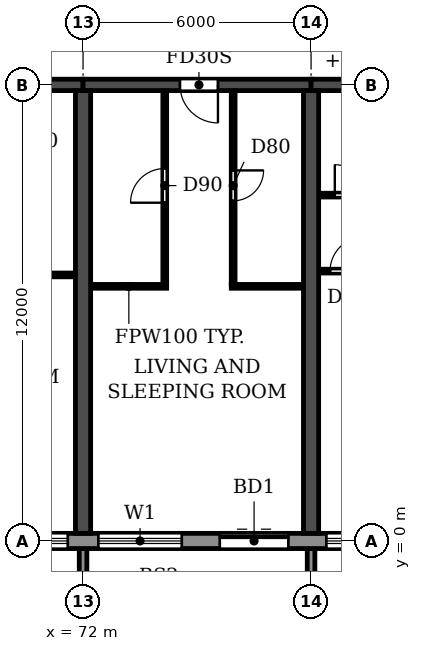
"""IFC4 building model, lengths in metres.
Left out: names, types, materials, properties, quantities, classifications, styles, units other than length and angle.
Written with IfcOpenShell. Run it as: python <this file> out.ifc"""

import sys

from ifc_helpers import new_model, si_unit, direction, frame, frame_2d, origin, place, context, subcontext, project, spatial, polyline, rectangle, outline, extrude, source, transform, mapped, element, fill, save


model = new_model("IFC4")
c1 = context("Model", 3, precision=1e-05, world=origin(), true_north=direction((0.0, 1.0)))
c2 = subcontext(c1, "Body", "Model", "MODEL_VIEW")
j1 = project(units=[si_unit("LENGTHUNIT", "METRE"), si_unit("PLANEANGLEUNIT", "RADIAN")], contexts=[c1])
p1 = place(None, origin())
s1 = spatial("IfcSite", under=j1, at=p1, CompositionType="ELEMENT")
p2 = place(p1, origin())
s2 = spatial("IfcBuilding", under=s1, at=p2, CompositionType="ELEMENT")
p3 = place(p2, frame((0.0, 0.0, 23.4)))
s3 = spatial("IfcBuildingStorey", under=s2, at=p3, CompositionType="ELEMENT", Elevation=23.4)
for number, where, z_axis, x_axis in (
    (1, (72.0, 0.2, 0.0), (0.0, 0.0, 1.0), (0.0, 1.0, 0.0)),
    (2, (78.0, 0.2, 0.0), (0.0, 0.0, 1.0), (0.0, 1.0, 0.0)),
):
    element("IfcWall", number, at=place(p3, frame(where, z_axis=z_axis, x_axis=x_axis)), inside=s3, PredefinedType="SHEAR", context=c2, shape_type="SweptSolid", body=[
        extrude(rectangle(XDim=11.65, YDim=0.4, at=frame_2d((5.825, 0.0))), origin(), (0.0, 0.0, 1.0), 3.05),
    ])
p4 = place(p3, frame((66.0, 12.0, 0.0), z_axis=(0.0, 0.0, 1.0), x_axis=(1.0, 0.0, 0.0)))
e3 = element("IfcWall", 3, at=p4, inside=s3, PredefinedType="SHEAR", context=c2, shape_type="SweptSolid", body=[
    extrude(rectangle(XDim=6.0, YDim=0.3, at=frame_2d((3.0, 0.0))), origin(), (0.0, 0.0, 1.0), 2.45),
])
p5 = place(p4, frame((2.45, 0.0, 0.0)))
e4 = element("IfcOpeningElement", 4, at=p5, cuts=e3, PredefinedType="OPENING", context=c2, shape_type="SweptSolid", body=[
    extrude(rectangle(XDim=1.0, YDim=2.1, at=frame_2d((0.5, 1.05))), frame((0.0, 0.16, 0.0), z_axis=(0.0, -1.0, 0.0), x_axis=(1.0, 0.0, 0.0)), (0.0, 0.0, 1.0), 0.32),
])
p6 = place(p3, frame((72.0, 12.0, 0.0), z_axis=(0.0, 0.0, 1.0), x_axis=(1.0, 0.0, 0.0)))
e5 = element("IfcWall", 5, at=p6, inside=s3, PredefinedType="SHEAR", context=c2, shape_type="SweptSolid", body=[
    extrude(rectangle(XDim=6.0, YDim=0.3, at=frame_2d((3.0, 0.0))), origin(), (0.0, 0.0, 1.0), 2.45),
])
p7 = place(p6, frame((2.55, 0.0, 0.0)))
e6 = element("IfcOpeningElement", 6, at=p7, cuts=e5, PredefinedType="OPENING", context=c2, shape_type="SweptSolid", body=[
    extrude(rectangle(XDim=1.0, YDim=2.1, at=frame_2d((0.5, 1.05))), frame((0.0, 0.16, 0.0), z_axis=(0.0, -1.0, 0.0), x_axis=(1.0, 0.0, 0.0)), (0.0, 0.0, 1.0), 0.32),
])
p8 = place(p3, frame((78.0, 12.0, 0.0), z_axis=(0.0, 0.0, 1.0), x_axis=(1.0, 0.0, 0.0)))
e7 = element("IfcWall", 7, at=p8, inside=s3, PredefinedType="SHEAR", context=c2, shape_type="SweptSolid", body=[
    extrude(rectangle(XDim=6.0, YDim=0.3, at=frame_2d((3.0, 0.0))), origin(), (0.0, 0.0, 1.0), 2.45),
])
p9 = place(p8, frame((2.45, 0.0, 0.0)))
e8 = element("IfcOpeningElement", 8, at=p9, cuts=e7, PredefinedType="OPENING", context=c2, shape_type="SweptSolid", body=[
    extrude(rectangle(XDim=1.0, YDim=2.1, at=frame_2d((0.5, 1.05))), frame((0.0, 0.16, 0.0), z_axis=(0.0, -1.0, 0.0), x_axis=(1.0, 0.0, 0.0)), (0.0, 0.0, 1.0), 0.32),
])
p10 = place(p3, frame((4.683, 0.0, 0.0), z_axis=(0.0, 0.0, 1.0), x_axis=(1.0, 0.0, 0.0)))
e9 = element("IfcWall", 9, at=p10, inside=s3, PredefinedType="STANDARD", context=c2, shape_type="SweptSolid", body=[
    extrude(rectangle(XDim=92.634, YDim=0.4, at=frame_2d((46.317, 0.0))), origin(), (0.0, 0.0, 1.0), 3.05),
])
p11 = place(p10, frame((1.717, 0.0, 0.9)))
e10 = element("IfcOpeningElement", 10, at=p11, cuts=e9, PredefinedType="OPENING", context=c2, shape_type="SweptSolid", body=[
    extrude(rectangle(XDim=2.2, YDim=1.5, at=frame_2d((1.1, 0.75))), frame((0.0, 0.21, 0.0), z_axis=(0.0, -1.0, 0.0), x_axis=(1.0, 0.0, 0.0)), (0.0, 0.0, 1.0), 0.42),
])
p12 = place(p10, frame((4.717, 0.0, 0.9)))
e11 = element("IfcOpeningElement", 11, at=p12, cuts=e9, PredefinedType="OPENING", context=c2, shape_type="SweptSolid", body=[
    extrude(rectangle(XDim=2.2, YDim=1.5, at=frame_2d((1.1, 0.75))), frame((0.0, 0.21, 0.0), z_axis=(0.0, -1.0, 0.0), x_axis=(1.0, 0.0, 0.0)), (0.0, 0.0, 1.0), 0.42),
])
p13 = place(p10, frame((7.717, 0.0, 0.9)))
e12 = element("IfcOpeningElement", 12, at=p13, cuts=e9, PredefinedType="OPENING", context=c2, shape_type="SweptSolid", body=[
    extrude(rectangle(XDim=2.2, YDim=1.5, at=frame_2d((1.1, 0.75))), frame((0.0, 0.21, 0.0), z_axis=(0.0, -1.0, 0.0), x_axis=(1.0, 0.0, 0.0)), (0.0, 0.0, 1.0), 0.42),
])
p14 = place(p10, frame((10.717, 0.0, 0.9)))
e13 = element("IfcOpeningElement", 13, at=p14, cuts=e9, PredefinedType="OPENING", context=c2, shape_type="SweptSolid", body=[
    extrude(rectangle(XDim=2.2, YDim=1.5, at=frame_2d((1.1, 0.75))), frame((0.0, 0.21, 0.0), z_axis=(0.0, -1.0, 0.0), x_axis=(1.0, 0.0, 0.0)), (0.0, 0.0, 1.0), 0.42),
])
p15 = place(p10, frame((13.717, 0.0, 0.9)))
e14 = element("IfcOpeningElement", 14, at=p15, cuts=e9, PredefinedType="OPENING", context=c2, shape_type="SweptSolid", body=[
    extrude(rectangle(XDim=2.2, YDim=1.5, at=frame_2d((1.1, 0.75))), frame((0.0, 0.21, 0.0), z_axis=(0.0, -1.0, 0.0), x_axis=(1.0, 0.0, 0.0)), (0.0, 0.0, 1.0), 0.42),
])
p16 = place(p10, frame((16.717, 0.0, 0.9)))
e15 = element("IfcOpeningElement", 15, at=p16, cuts=e9, PredefinedType="OPENING", context=c2, shape_type="SweptSolid", body=[
    extrude(rectangle(XDim=2.2, YDim=1.5, at=frame_2d((1.1, 0.75))), frame((0.0, 0.21, 0.0), z_axis=(0.0, -1.0, 0.0), x_axis=(1.0, 0.0, 0.0)), (0.0, 0.0, 1.0), 0.42),
])
p17 = place(p10, frame((19.917, 0.0, 0.0)))
e16 = element("IfcOpeningElement", 16, at=p17, cuts=e9, PredefinedType="OPENING", context=c2, shape_type="SweptSolid", body=[
    extrude(rectangle(XDim=1.8, YDim=2.4, at=frame_2d((0.9, 1.2))), frame((0.0, 0.21, 0.0), z_axis=(0.0, -1.0, 0.0), x_axis=(1.0, 0.0, 0.0)), (0.0, 0.0, 1.0), 0.42),
])
p18 = place(p10, frame((22.717, 0.0, 0.9)))
e17 = element("IfcOpeningElement", 17, at=p18, cuts=e9, PredefinedType="OPENING", context=c2, shape_type="SweptSolid", body=[
    extrude(rectangle(XDim=2.2, YDim=1.5, at=frame_2d((1.1, 0.75))), frame((0.0, 0.21, 0.0), z_axis=(0.0, -1.0, 0.0), x_axis=(1.0, 0.0, 0.0)), (0.0, 0.0, 1.0), 0.42),
])
p19 = place(p10, frame((25.717, 0.0, 0.9)))
e18 = element("IfcOpeningElement", 18, at=p19, cuts=e9, PredefinedType="OPENING", context=c2, shape_type="SweptSolid", body=[
    extrude(rectangle(XDim=2.2, YDim=1.5, at=frame_2d((1.1, 0.75))), frame((0.0, 0.21, 0.0), z_axis=(0.0, -1.0, 0.0), x_axis=(1.0, 0.0, 0.0)), (0.0, 0.0, 1.0), 0.42),
])
p20 = place(p10, frame((28.717, 0.0, 0.9)))
e19 = element("IfcOpeningElement", 19, at=p20, cuts=e9, PredefinedType="OPENING", context=c2, shape_type="SweptSolid", body=[
    extrude(rectangle(XDim=2.2, YDim=1.5, at=frame_2d((1.1, 0.75))), frame((0.0, 0.21, 0.0), z_axis=(0.0, -1.0, 0.0), x_axis=(1.0, 0.0, 0.0)), (0.0, 0.0, 1.0), 0.42),
])
p21 = place(p10, frame((31.917, 0.0, 0.0)))
e20 = element("IfcOpeningElement", 20, at=p21, cuts=e9, PredefinedType="OPENING", context=c2, shape_type="SweptSolid", body=[
    extrude(rectangle(XDim=1.8, YDim=2.4, at=frame_2d((0.9, 1.2))), frame((0.0, 0.21, 0.0), z_axis=(0.0, -1.0, 0.0), x_axis=(1.0, 0.0, 0.0)), (0.0, 0.0, 1.0), 0.42),
])
p22 = place(p10, frame((34.717, 0.0, 0.9)))
e21 = element("IfcOpeningElement", 21, at=p22, cuts=e9, PredefinedType="OPENING", context=c2, shape_type="SweptSolid", body=[
    extrude(rectangle(XDim=2.2, YDim=1.5, at=frame_2d((1.1, 0.75))), frame((0.0, 0.21, 0.0), z_axis=(0.0, -1.0, 0.0), x_axis=(1.0, 0.0, 0.0)), (0.0, 0.0, 1.0), 0.42),
])
p23 = place(p10, frame((37.717, 0.0, 0.9)))
e22 = element("IfcOpeningElement", 22, at=p23, cuts=e9, PredefinedType="OPENING", context=c2, shape_type="SweptSolid", body=[
    extrude(rectangle(XDim=2.2, YDim=1.5, at=frame_2d((1.1, 0.75))), frame((0.0, 0.21, 0.0), z_axis=(0.0, -1.0, 0.0), x_axis=(1.0, 0.0, 0.0)), (0.0, 0.0, 1.0), 0.42),
])
p24 = place(p10, frame((40.717, 0.0, 0.9)))
e23 = element("IfcOpeningElement", 23, at=p24, cuts=e9, PredefinedType="OPENING", context=c2, shape_type="SweptSolid", body=[
    extrude(rectangle(XDim=2.2, YDim=1.5, at=frame_2d((1.1, 0.75))), frame((0.0, 0.21, 0.0), z_axis=(0.0, -1.0, 0.0), x_axis=(1.0, 0.0, 0.0)), (0.0, 0.0, 1.0), 0.42),
])
p25 = place(p10, frame((43.917, 0.0, 0.0)))
e24 = element("IfcOpeningElement", 24, at=p25, cuts=e9, PredefinedType="OPENING", context=c2, shape_type="SweptSolid", body=[
    extrude(rectangle(XDim=1.8, YDim=2.4, at=frame_2d((0.9, 1.2))), frame((0.0, 0.21, 0.0), z_axis=(0.0, -1.0, 0.0), x_axis=(1.0, 0.0, 0.0)), (0.0, 0.0, 1.0), 0.42),
])
p26 = place(p10, frame((46.717, 0.0, 0.9)))
e25 = element("IfcOpeningElement", 25, at=p26, cuts=e9, PredefinedType="OPENING", context=c2, shape_type="SweptSolid", body=[
    extrude(rectangle(XDim=2.2, YDim=1.5, at=frame_2d((1.1, 0.75))), frame((0.0, 0.21, 0.0), z_axis=(0.0, -1.0, 0.0), x_axis=(1.0, 0.0, 0.0)), (0.0, 0.0, 1.0), 0.42),
])
p27 = place(p10, frame((49.717, 0.0, 0.9)))
e26 = element("IfcOpeningElement", 26, at=p27, cuts=e9, PredefinedType="OPENING", context=c2, shape_type="SweptSolid", body=[
    extrude(rectangle(XDim=2.2, YDim=1.5, at=frame_2d((1.1, 0.75))), frame((0.0, 0.21, 0.0), z_axis=(0.0, -1.0, 0.0), x_axis=(1.0, 0.0, 0.0)), (0.0, 0.0, 1.0), 0.42),
])
p28 = place(p10, frame((52.717, 0.0, 0.9)))
e27 = element("IfcOpeningElement", 27, at=p28, cuts=e9, PredefinedType="OPENING", context=c2, shape_type="SweptSolid", body=[
    extrude(rectangle(XDim=2.2, YDim=1.5, at=frame_2d((1.1, 0.75))), frame((0.0, 0.21, 0.0), z_axis=(0.0, -1.0, 0.0), x_axis=(1.0, 0.0, 0.0)), (0.0, 0.0, 1.0), 0.42),
])
p29 = place(p10, frame((55.717, 0.0, 0.9)))
e28 = element("IfcOpeningElement", 28, at=p29, cuts=e9, PredefinedType="OPENING", context=c2, shape_type="SweptSolid", body=[
    extrude(rectangle(XDim=2.2, YDim=1.5, at=frame_2d((1.1, 0.75))), frame((0.0, 0.21, 0.0), z_axis=(0.0, -1.0, 0.0), x_axis=(1.0, 0.0, 0.0)), (0.0, 0.0, 1.0), 0.42),
])
p30 = place(p10, frame((58.917, 0.0, 0.0)))
e29 = element("IfcOpeningElement", 29, at=p30, cuts=e9, PredefinedType="OPENING", context=c2, shape_type="SweptSolid", body=[
    extrude(rectangle(XDim=1.8, YDim=2.4, at=frame_2d((0.9, 1.2))), frame((0.0, 0.21, 0.0), z_axis=(0.0, -1.0, 0.0), x_axis=(1.0, 0.0, 0.0)), (0.0, 0.0, 1.0), 0.42),
])
p31 = place(p10, frame((61.717, 0.0, 0.9)))
e30 = element("IfcOpeningElement", 30, at=p31, cuts=e9, PredefinedType="OPENING", context=c2, shape_type="SweptSolid", body=[
    extrude(rectangle(XDim=2.2, YDim=1.5, at=frame_2d((1.1, 0.75))), frame((0.0, 0.21, 0.0), z_axis=(0.0, -1.0, 0.0), x_axis=(1.0, 0.0, 0.0)), (0.0, 0.0, 1.0), 0.42),
])
p32 = place(p10, frame((64.717, 0.0, 0.9)))
e31 = element("IfcOpeningElement", 31, at=p32, cuts=e9, PredefinedType="OPENING", context=c2, shape_type="SweptSolid", body=[
    extrude(rectangle(XDim=2.2, YDim=1.5, at=frame_2d((1.1, 0.75))), frame((0.0, 0.21, 0.0), z_axis=(0.0, -1.0, 0.0), x_axis=(1.0, 0.0, 0.0)), (0.0, 0.0, 1.0), 0.42),
])
p33 = place(p10, frame((67.717, 0.0, 0.9)))
e32 = element("IfcOpeningElement", 32, at=p33, cuts=e9, PredefinedType="OPENING", context=c2, shape_type="SweptSolid", body=[
    extrude(rectangle(XDim=2.2, YDim=1.5, at=frame_2d((1.1, 0.75))), frame((0.0, 0.21, 0.0), z_axis=(0.0, -1.0, 0.0), x_axis=(1.0, 0.0, 0.0)), (0.0, 0.0, 1.0), 0.42),
])
p34 = place(p10, frame((70.917, 0.0, 0.0)))
e33 = element("IfcOpeningElement", 33, at=p34, cuts=e9, PredefinedType="OPENING", context=c2, shape_type="SweptSolid", body=[
    extrude(rectangle(XDim=1.8, YDim=2.4, at=frame_2d((0.9, 1.2))), frame((0.0, 0.21, 0.0), z_axis=(0.0, -1.0, 0.0), x_axis=(1.0, 0.0, 0.0)), (0.0, 0.0, 1.0), 0.42),
])
p35 = place(p10, frame((73.717, 0.0, 0.9)))
e34 = element("IfcOpeningElement", 34, at=p35, cuts=e9, PredefinedType="OPENING", context=c2, shape_type="SweptSolid", body=[
    extrude(rectangle(XDim=2.2, YDim=1.5, at=frame_2d((1.1, 0.75))), frame((0.0, 0.21, 0.0), z_axis=(0.0, -1.0, 0.0), x_axis=(1.0, 0.0, 0.0)), (0.0, 0.0, 1.0), 0.42),
])
p36 = place(p10, frame((76.717, 0.0, 0.9)))
e35 = element("IfcOpeningElement", 35, at=p36, cuts=e9, PredefinedType="OPENING", context=c2, shape_type="SweptSolid", body=[
    extrude(rectangle(XDim=2.2, YDim=1.5, at=frame_2d((1.1, 0.75))), frame((0.0, 0.21, 0.0), z_axis=(0.0, -1.0, 0.0), x_axis=(1.0, 0.0, 0.0)), (0.0, 0.0, 1.0), 0.42),
])
p37 = place(p10, frame((79.717, 0.0, 0.9)))
e36 = element("IfcOpeningElement", 36, at=p37, cuts=e9, PredefinedType="OPENING", context=c2, shape_type="SweptSolid", body=[
    extrude(rectangle(XDim=2.2, YDim=1.5, at=frame_2d((1.1, 0.75))), frame((0.0, 0.21, 0.0), z_axis=(0.0, -1.0, 0.0), x_axis=(1.0, 0.0, 0.0)), (0.0, 0.0, 1.0), 0.42),
])
p38 = place(p10, frame((82.717, 0.0, 0.9)))
e37 = element("IfcOpeningElement", 37, at=p38, cuts=e9, PredefinedType="OPENING", context=c2, shape_type="SweptSolid", body=[
    extrude(rectangle(XDim=2.2, YDim=1.5, at=frame_2d((1.1, 0.75))), frame((0.0, 0.21, 0.0), z_axis=(0.0, -1.0, 0.0), x_axis=(1.0, 0.0, 0.0)), (0.0, 0.0, 1.0), 0.42),
])
p39 = place(p10, frame((85.717, 0.0, 0.9)))
e38 = element("IfcOpeningElement", 38, at=p39, cuts=e9, PredefinedType="OPENING", context=c2, shape_type="SweptSolid", body=[
    extrude(rectangle(XDim=2.2, YDim=1.5, at=frame_2d((1.1, 0.75))), frame((0.0, 0.21, 0.0), z_axis=(0.0, -1.0, 0.0), x_axis=(1.0, 0.0, 0.0)), (0.0, 0.0, 1.0), 0.42),
])
p40 = place(p10, frame((88.717, 0.0, 0.9)))
e39 = element("IfcOpeningElement", 39, at=p40, cuts=e9, PredefinedType="OPENING", context=c2, shape_type="SweptSolid", body=[
    extrude(rectangle(XDim=2.2, YDim=1.5, at=frame_2d((1.1, 0.75))), frame((0.0, 0.21, 0.0), z_axis=(0.0, -1.0, 0.0), x_axis=(1.0, 0.0, 0.0)), (0.0, 0.0, 1.0), 0.42),
])
m1 = source(origin(), c2, "Body", "SweptSolid", [
    extrude(outline(polyline([(0.0, 0.0), (0.2, 0.0), (0.2, 1.65), (0.0, 1.65), (0.0, 0.0)])), origin(), (0.0, 0.0, 1.0), 3.1),
])
for number, where in (
    (40, (71.9, -1.85, 0.0)),
    (41, (77.9, -1.85, 0.0)),
):
    element("IfcWall", number, at=place(p3, frame(where)), inside=s3, PredefinedType="STANDARD", context=c2, shape_type="MappedRepresentation", body=[
        mapped(m1, transform((0.0, 0.0, 0.0))),
    ])
p41 = place(p3, frame((72.21, 6.7, 0.0), z_axis=(0.0, 0.0, 1.0), x_axis=(1.0, 0.0, 0.0)))
e42 = element("IfcWall", 42, at=p41, inside=s3, PredefinedType="PARTITIONING", context=c2, shape_type="SweptSolid", body=[
    extrude(rectangle(XDim=1.99, YDim=0.1, at=frame_2d((0.995, 0.0))), origin(), (0.0, 0.0, 1.0), 3.05),
])
p42 = place(p3, frame((75.9, 6.7, 0.0), z_axis=(0.0, 0.0, 1.0), x_axis=(1.0, 0.0, 0.0)))
e43 = element("IfcWall", 43, at=p42, inside=s3, PredefinedType="PARTITIONING", context=c2, shape_type="SweptSolid", body=[
    extrude(rectangle(XDim=1.89, YDim=0.1, at=frame_2d((0.945, 0.0))), origin(), (0.0, 0.0, 1.0), 3.05),
])
p43 = place(p3, frame((69.8, 7.0, 0.0), z_axis=(0.0, 0.0, 1.0), x_axis=(1.0, 0.0, 0.0)))
e44 = element("IfcWall", 44, at=p43, inside=s3, PredefinedType="PARTITIONING", context=c2, shape_type="SweptSolid", body=[
    extrude(rectangle(XDim=1.99, YDim=0.1, at=frame_2d((0.995, 0.0))), origin(), (0.0, 0.0, 1.0), 3.05),
])
p44 = place(p3, frame((78.21, 7.1, 0.0), z_axis=(0.0, 0.0, 1.0), x_axis=(1.0, 0.0, 0.0)))
e45 = element("IfcWall", 45, at=p44, inside=s3, PredefinedType="PARTITIONING", context=c2, shape_type="SweptSolid", body=[
    extrude(rectangle(XDim=2.84, YDim=0.1, at=frame_2d((1.42, 0.0))), origin(), (0.0, 0.0, 1.0), 3.05),
])
p45 = place(p44, frame((0.29, 0.0, 0.0)))
e46 = element("IfcOpeningElement", 46, at=p45, cuts=e45, PredefinedType="OPENING", context=c2, shape_type="SweptSolid", body=[
    extrude(rectangle(XDim=0.9, YDim=2.1, at=frame_2d((0.45, 1.05))), frame((0.0, 0.06, 0.0), z_axis=(0.0, -1.0, 0.0), x_axis=(1.0, 0.0, 0.0)), (0.0, 0.0, 1.0), 0.12),
])
p46 = place(p3, frame((78.21, 9.1, 0.0), z_axis=(0.0, 0.0, 1.0), x_axis=(1.0, 0.0, 0.0)))
e47 = element("IfcWall", 47, at=p46, inside=s3, PredefinedType="PARTITIONING", context=c2, shape_type="SweptSolid", body=[
    extrude(rectangle(XDim=1.89, YDim=0.1, at=frame_2d((0.945, 0.0))), origin(), (0.0, 0.0, 1.0), 3.05),
])
p47 = place(p46, frame((0.415, 0.0, 0.0)))
e48 = element("IfcOpeningElement", 48, at=p47, cuts=e47, PredefinedType="OPENING", context=c2, shape_type="SweptSolid", body=[
    extrude(rectangle(XDim=0.8, YDim=2.1, at=frame_2d((0.4, 1.05))), frame((0.0, 0.06, 0.0), z_axis=(0.0, -1.0, 0.0), x_axis=(1.0, 0.0, 0.0)), (0.0, 0.0, 1.0), 0.12),
])
p48 = place(p3, frame((74.15, 6.75, 0.0), z_axis=(0.0, 0.0, 1.0), x_axis=(0.0, 1.0, 0.0)))
e49 = element("IfcWall", 49, at=p48, inside=s3, PredefinedType="PARTITIONING", context=c2, shape_type="SweptSolid", body=[
    extrude(rectangle(XDim=5.09, YDim=0.1, at=frame_2d((2.545, 0.0))), origin(), (0.0, 0.0, 1.0), 3.05),
])
p49 = place(p48, frame((2.15, 0.0, 0.0)))
e50 = element("IfcOpeningElement", 50, at=p49, cuts=e49, PredefinedType="OPENING", context=c2, shape_type="SweptSolid", body=[
    extrude(rectangle(XDim=0.9, YDim=2.1, at=frame_2d((0.45, 1.05))), frame((0.0, 0.06, 0.0), z_axis=(0.0, -1.0, 0.0), x_axis=(1.0, 0.0, 0.0)), (0.0, 0.0, 1.0), 0.12),
])
p50 = place(p3, frame((75.95, 6.75, 0.0), z_axis=(0.0, 0.0, 1.0), x_axis=(0.0, 1.0, 0.0)))
e51 = element("IfcWall", 51, at=p50, inside=s3, PredefinedType="PARTITIONING", context=c2, shape_type="SweptSolid", body=[
    extrude(rectangle(XDim=5.09, YDim=0.1, at=frame_2d((2.545, 0.0))), origin(), (0.0, 0.0, 1.0), 3.05),
])
p51 = place(p50, frame((2.2, 0.0, 0.0)))
e52 = element("IfcOpeningElement", 52, at=p51, cuts=e51, PredefinedType="OPENING", context=c2, shape_type="SweptSolid", body=[
    extrude(rectangle(XDim=0.8, YDim=2.1, at=frame_2d((0.4, 1.05))), frame((0.0, 0.06, 0.0), z_axis=(0.0, -1.0, 0.0), x_axis=(1.0, 0.0, 0.0)), (0.0, 0.0, 1.0), 0.12),
])
p52 = place(p32, origin())
e53 = element("IfcWindow", 53, at=p52, inside=s3, PartitioningType="DOUBLE_PANEL_HORIZONTAL", PredefinedType="WINDOW", context=c2, shape_type="SweptSolid", body=[
    extrude(rectangle(XDim=2.2, YDim=1.5, at=frame_2d((1.1, 0.75))), frame((0.0, 0.03, 0.0), z_axis=(0.0, -1.0, 0.0), x_axis=(1.0, 0.0, 0.0)), (0.0, 0.0, 1.0), 0.06),
])
fill(e31, e53)
p53 = place(p33, origin())
e54 = element("IfcWindow", 54, at=p53, inside=s3, PartitioningType="DOUBLE_PANEL_HORIZONTAL", PredefinedType="WINDOW", context=c2, shape_type="SweptSolid", body=[
    extrude(rectangle(XDim=2.2, YDim=1.5, at=frame_2d((1.1, 0.75))), frame((0.0, 0.03, 0.0), z_axis=(0.0, -1.0, 0.0), x_axis=(1.0, 0.0, 0.0)), (0.0, 0.0, 1.0), 0.06),
])
fill(e32, e54)
p54 = place(p34, origin())
e55 = element("IfcDoor", 55, at=p54, inside=s3, OperationType="DOUBLE_DOOR_SLIDING", PredefinedType="DOOR", context=c2, shape_type="SweptSolid", body=[
    extrude(rectangle(XDim=1.8, YDim=2.4, at=frame_2d((0.9, 1.2))), frame((0.0, 0.025, 0.0), z_axis=(0.0, -1.0, 0.0), x_axis=(1.0, 0.0, 0.0)), (0.0, 0.0, 1.0), 0.05),
])
fill(e33, e55)
p55 = place(p35, origin())
e56 = element("IfcWindow", 56, at=p55, inside=s3, PartitioningType="DOUBLE_PANEL_HORIZONTAL", PredefinedType="WINDOW", context=c2, shape_type="SweptSolid", body=[
    extrude(rectangle(XDim=2.2, YDim=1.5, at=frame_2d((1.1, 0.75))), frame((0.0, 0.03, 0.0), z_axis=(0.0, -1.0, 0.0), x_axis=(1.0, 0.0, 0.0)), (0.0, 0.0, 1.0), 0.06),
])
fill(e34, e56)
p56 = place(p49, origin())
e57 = element("IfcDoor", 57, at=p56, inside=s3, OperationType="SINGLE_SWING_LEFT", PredefinedType="DOOR", context=c2, shape_type="SweptSolid", body=[
    extrude(rectangle(XDim=0.9, YDim=2.1, at=frame_2d((0.45, 1.05))), frame((0.0, 0.025, 0.0), z_axis=(0.0, -1.0, 0.0), x_axis=(1.0, 0.0, 0.0)), (0.0, 0.0, 1.0), 0.05),
])
fill(e50, e57)
p57 = place(p7, frame((1.0, 0.0, 0.0), z_axis=(0.0, 0.0, 1.0), x_axis=(-1.0, 0.0, 0.0)))
e58 = element("IfcDoor", 58, at=p57, inside=s3, OperationType="SINGLE_SWING_LEFT", PredefinedType="DOOR", context=c2, shape_type="SweptSolid", body=[
    extrude(rectangle(XDim=1.0, YDim=2.1, at=frame_2d((0.5, 1.05))), frame((0.0, 0.025, 0.0), z_axis=(0.0, -1.0, 0.0), x_axis=(1.0, 0.0, 0.0)), (0.0, 0.0, 1.0), 0.05),
])
fill(e6, e58)
p58 = place(p51, frame((0.8, 0.0, 0.0), z_axis=(0.0, 0.0, 1.0), x_axis=(-1.0, 0.0, 0.0)))
e59 = element("IfcDoor", 59, at=p58, inside=s3, OperationType="SINGLE_SWING_LEFT", PredefinedType="DOOR", context=c2, shape_type="SweptSolid", body=[
    extrude(rectangle(XDim=0.8, YDim=2.1, at=frame_2d((0.4, 1.05))), frame((0.0, 0.025, 0.0), z_axis=(0.0, -1.0, 0.0), x_axis=(1.0, 0.0, 0.0)), (0.0, 0.0, 1.0), 0.05),
])
fill(e52, e59)
p59 = place(p45, origin())
e60 = element("IfcDoor", 60, at=p59, inside=s3, OperationType="SINGLE_SWING_RIGHT", PredefinedType="DOOR", context=c2, shape_type="SweptSolid", body=[
    extrude(rectangle(XDim=0.9, YDim=2.1, at=frame_2d((0.45, 1.05))), frame((0.0, 0.025, 0.0), z_axis=(0.0, -1.0, 0.0), x_axis=(1.0, 0.0, 0.0)), (0.0, 0.0, 1.0), 0.05),
])
fill(e46, e60)
p60 = place(p47, origin())
e61 = element("IfcDoor", 61, at=p60, inside=s3, OperationType="SINGLE_SWING_LEFT", PredefinedType="DOOR", context=c2, shape_type="SweptSolid", body=[
    extrude(rectangle(XDim=0.8, YDim=2.1, at=frame_2d((0.4, 1.05))), frame((0.0, 0.025, 0.0), z_axis=(0.0, -1.0, 0.0), x_axis=(1.0, 0.0, 0.0)), (0.0, 0.0, 1.0), 0.05),
])
fill(e48, e61)
save(model, sys.argv[1])
